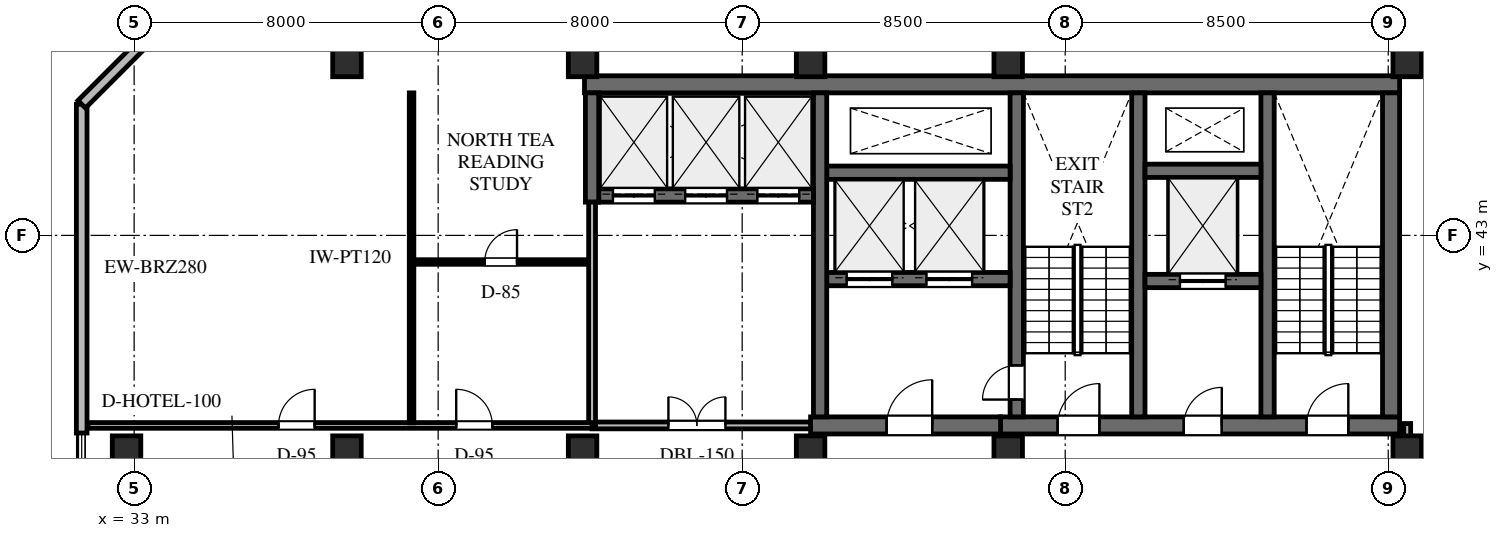
"""IFC4 building model, lengths in metres.
Left out: names, types, materials, properties, quantities, classifications, styles, units other than length and angle.
Written with IfcOpenShell. Run it as: python <this file> out.ifc"""

import sys

from ifc_helpers import new_model, si_unit, direction, frame, frame_2d, origin, origin_2d, place, context, subcontext, project, spatial, rectangle, extrude, element, fill, save


model = new_model("IFC4")
c1 = context("Model", 3, precision=1e-05, world=origin(), true_north=direction((0.0, 1.0)))
c2 = subcontext(c1, "Body", "Model", "MODEL_VIEW")
j1 = project(units=[si_unit("LENGTHUNIT", "METRE"), si_unit("PLANEANGLEUNIT", "RADIAN")], contexts=[c1])
p1 = place(None, origin())
s1 = spatial("IfcSite", under=j1, at=p1, CompositionType="ELEMENT")
p2 = place(p1, origin())
s2 = spatial("IfcBuilding", under=s1, at=p2, CompositionType="ELEMENT")
p3 = place(p2, frame((0.0, 0.0, 289.5)))
s3 = spatial("IfcBuildingStorey", under=s2, at=p3, CompositionType="ELEMENT", Elevation=289.5)
p4 = place(p3, frame((44.85, 46.975, 0.0), z_axis=(0.0, 0.0, 1.0), x_axis=(1.0, 0.0, 0.0)))
e1 = element("IfcWall", 1, at=p4, inside=s3, PredefinedType="SHEAR", context=c2, shape_type="SweptSolid", body=[
    extrude(rectangle(XDim=21.45, YDim=0.45, at=frame_2d((10.725, 0.0))), origin(), (0.0, 0.0, 1.0), 3.6),
])
p5 = place(p3, frame((55.8, 38.0, 0.0), z_axis=(0.0, 0.0, 1.0), x_axis=(1.0, 0.0, 0.0)))
e2 = element("IfcWall", 2, at=p5, inside=s3, PredefinedType="SHEAR", context=c2, shape_type="SweptSolid", body=[
    extrude(rectangle(XDim=10.5, YDim=0.45, at=frame_2d((5.25, 0.0))), origin(), (0.0, 0.0, 1.0), 3.6),
])
p6 = place(p5, frame((1.5, 0.0, 0.0)))
e3 = element("IfcOpeningElement", 3, at=p6, cuts=e2, PredefinedType="OPENING", context=c2, shape_type="SweptSolid", body=[
    extrude(rectangle(XDim=1.1, YDim=2.2, at=frame_2d((0.55, 1.1))), frame((0.0, 0.235, 0.0), z_axis=(0.0, -1.0, 0.0), x_axis=(1.0, 0.0, 0.0)), (0.0, 0.0, 1.0), 0.47),
])
p7 = place(p5, frame((4.82, 0.0, 0.0)))
e4 = element("IfcOpeningElement", 4, at=p7, cuts=e2, PredefinedType="OPENING", context=c2, shape_type="SweptSolid", body=[
    extrude(rectangle(XDim=1.0, YDim=2.15, at=frame_2d((0.5, 1.075))), frame((0.0, 0.235, 0.0), z_axis=(0.0, -1.0, 0.0), x_axis=(1.0, 0.0, 0.0)), (0.0, 0.0, 1.0), 0.47),
])
p8 = place(p5, frame((8.05, 0.0, 0.0)))
e5 = element("IfcOpeningElement", 5, at=p8, cuts=e2, PredefinedType="OPENING", context=c2, shape_type="SweptSolid", body=[
    extrude(rectangle(XDim=1.1, YDim=2.2, at=frame_2d((0.55, 1.1))), frame((0.0, 0.235, 0.0), z_axis=(0.0, -1.0, 0.0), x_axis=(1.0, 0.0, 0.0)), (0.0, 0.0, 1.0), 0.47),
])
p9 = place(p3, frame((66.075, 38.225, 0.0), z_axis=(0.0, 0.0, 1.0), x_axis=(0.0, 1.0, 0.0)))
e6 = element("IfcWall", 6, at=p9, inside=s3, PredefinedType="SHEAR", context=c2, shape_type="SweptSolid", body=[
    extrude(rectangle(XDim=8.525, YDim=0.45, at=frame_2d((4.262, 0.0))), origin(), (0.0, 0.0, 1.0), 3.6),
])
for number, where, z_axis, x_axis in (
    (7, (62.825, 38.225, 0.0), (0.0, 0.0, 1.0), (0.0, 1.0, 0.0)),
    (8, (59.425, 38.225, 0.0), (0.0, 0.0, 1.0), (0.0, 1.0, 0.0)),
):
    element("IfcWall", number, at=place(p3, frame(where, z_axis=z_axis, x_axis=x_axis)), inside=s3, PredefinedType="SHEAR", context=c2, shape_type="SweptSolid", body=[
        extrude(rectangle(XDim=8.525, YDim=0.35, at=frame_2d((4.262, 0.0))), origin(), (0.0, 0.0, 1.0), 3.6),
    ])
p10 = place(p3, frame((56.225, 38.225, 0.0), z_axis=(0.0, 0.0, 1.0), x_axis=(0.0, 1.0, 0.0)))
e9 = element("IfcWall", 9, at=p10, inside=s3, PredefinedType="SHEAR", context=c2, shape_type="SweptSolid", body=[
    extrude(rectangle(XDim=8.525, YDim=0.35, at=frame_2d((4.262, 0.0))), origin(), (0.0, 0.0, 1.0), 3.6),
])
p11 = place(p10, frame((0.455, 0.0, 0.0)))
e10 = element("IfcOpeningElement", 10, at=p11, cuts=e9, PredefinedType="OPENING", context=c2, shape_type="SweptSolid", body=[
    extrude(rectangle(XDim=0.9, YDim=2.15, at=frame_2d((0.45, 1.075))), frame((0.0, 0.185, 0.0), z_axis=(0.0, -1.0, 0.0), x_axis=(1.0, 0.0, 0.0)), (0.0, 0.0, 1.0), 0.37),
])
p12 = place(p3, frame((59.6, 41.8, 0.0), z_axis=(0.0, 0.0, 1.0), x_axis=(1.0, 0.0, 0.0)))
e11 = element("IfcWall", 11, at=p12, inside=s3, PredefinedType="SHEAR", context=c2, shape_type="SweptSolid", body=[
    extrude(rectangle(XDim=3.05, YDim=0.35, at=frame_2d((1.525, 0.0))), origin(), (0.0, 0.0, 1.0), 3.6),
])
p13 = place(p12, frame((0.92, 0.0, 0.0)))
e12 = element("IfcOpeningElement", 12, at=p13, cuts=e11, PredefinedType="OPENING", context=c2, shape_type="SweptSolid", body=[
    extrude(rectangle(XDim=1.2, YDim=2.2, at=frame_2d((0.6, 1.1))), frame((0.0, 0.185, 0.0), z_axis=(0.0, -1.0, 0.0), x_axis=(1.0, 0.0, 0.0)), (0.0, 0.0, 1.0), 0.37),
])
p14 = place(p3, frame((59.6, 44.7, 0.0), z_axis=(0.0, 0.0, 1.0), x_axis=(1.0, 0.0, 0.0)))
e13 = element("IfcWall", 13, at=p14, inside=s3, PredefinedType="SHEAR", context=c2, shape_type="SweptSolid", body=[
    extrude(rectangle(XDim=3.05, YDim=0.35, at=frame_2d((1.525, 0.0))), origin(), (0.0, 0.0, 1.0), 3.6),
])
p15 = place(p3, frame((50.8, 38.0, 0.0), z_axis=(0.0, 0.0, 1.0), x_axis=(1.0, 0.0, 0.0)))
e14 = element("IfcWall", 14, at=p15, inside=s3, PredefinedType="SHEAR", context=c2, shape_type="SweptSolid", body=[
    extrude(rectangle(XDim=5.0, YDim=0.45, at=frame_2d((2.5, 0.0))), origin(), (0.0, 0.0, 1.0), 3.6),
])
p16 = place(p15, frame((2.0, 0.0, 0.0)))
e15 = element("IfcOpeningElement", 15, at=p16, cuts=e14, PredefinedType="OPENING", context=c2, shape_type="SweptSolid", body=[
    extrude(rectangle(XDim=1.2, YDim=2.2, at=frame_2d((0.6, 1.1))), frame((0.0, 0.235, 0.0), z_axis=(0.0, -1.0, 0.0), x_axis=(1.0, 0.0, 0.0)), (0.0, 0.0, 1.0), 0.47),
])
p17 = place(p3, frame((51.225, 41.85, 0.0), z_axis=(0.0, 0.0, 1.0), x_axis=(1.0, 0.0, 0.0)))
e16 = element("IfcWall", 16, at=p17, inside=s3, PredefinedType="SHEAR", context=c2, shape_type="SweptSolid", body=[
    extrude(rectangle(XDim=4.825, YDim=0.35, at=frame_2d((2.413, 0.0))), origin(), (0.0, 0.0, 1.0), 3.6),
])
p18 = place(p17, frame((0.525, 0.0, 0.0)))
e17 = element("IfcOpeningElement", 17, at=p18, cuts=e16, PredefinedType="OPENING", context=c2, shape_type="SweptSolid", body=[
    extrude(rectangle(XDim=1.2, YDim=2.2, at=frame_2d((0.6, 1.1))), frame((0.0, 0.185, 0.0), z_axis=(0.0, -1.0, 0.0), x_axis=(1.0, 0.0, 0.0)), (0.0, 0.0, 1.0), 0.37),
])
p19 = place(p17, frame((2.625, 0.0, 0.0)))
e18 = element("IfcOpeningElement", 18, at=p19, cuts=e16, PredefinedType="OPENING", context=c2, shape_type="SweptSolid", body=[
    extrude(rectangle(XDim=1.2, YDim=2.2, at=frame_2d((0.6, 1.1))), frame((0.0, 0.185, 0.0), z_axis=(0.0, -1.0, 0.0), x_axis=(1.0, 0.0, 0.0)), (0.0, 0.0, 1.0), 0.37),
])
p20 = place(p3, frame((51.225, 44.65, 0.0), z_axis=(0.0, 0.0, 1.0), x_axis=(1.0, 0.0, 0.0)))
e19 = element("IfcWall", 19, at=p20, inside=s3, PredefinedType="SHEAR", context=c2, shape_type="SweptSolid", body=[
    extrude(rectangle(XDim=4.825, YDim=0.35, at=frame_2d((2.413, 0.0))), origin(), (0.0, 0.0, 1.0), 3.6),
])
p21 = place(p3, frame((51.05, 38.225, 0.0), z_axis=(0.0, 0.0, 1.0), x_axis=(0.0, 1.0, 0.0)))
e20 = element("IfcWall", 20, at=p21, inside=s3, PredefinedType="SHEAR", context=c2, shape_type="SweptSolid", body=[
    extrude(rectangle(XDim=8.525, YDim=0.35, at=frame_2d((4.262, 0.0))), origin(), (0.0, 0.0, 1.0), 3.6),
])
p22 = place(p3, frame((45.225, 44.05, 0.0), z_axis=(0.0, 0.0, 1.0), x_axis=(1.0, 0.0, 0.0)))
e21 = element("IfcWall", 21, at=p22, inside=s3, PredefinedType="SHEAR", context=c2, shape_type="SweptSolid", body=[
    extrude(rectangle(XDim=5.65, YDim=0.35, at=frame_2d((2.825, 0.0))), origin(), (0.0, 0.0, 1.0), 3.6),
])
p23 = place(p22, frame((0.375, 0.0, 0.0)))
e22 = element("IfcOpeningElement", 22, at=p23, cuts=e21, PredefinedType="OPENING", context=c2, shape_type="SweptSolid", body=[
    extrude(rectangle(XDim=1.1, YDim=2.2, at=frame_2d((0.55, 1.1))), frame((0.0, 0.185, 0.0), z_axis=(0.0, -1.0, 0.0), x_axis=(1.0, 0.0, 0.0)), (0.0, 0.0, 1.0), 0.37),
])
p24 = place(p22, frame((2.275, 0.0, 0.0)))
e23 = element("IfcOpeningElement", 23, at=p24, cuts=e21, PredefinedType="OPENING", context=c2, shape_type="SweptSolid", body=[
    extrude(rectangle(XDim=1.1, YDim=2.2, at=frame_2d((0.55, 1.1))), frame((0.0, 0.185, 0.0), z_axis=(0.0, -1.0, 0.0), x_axis=(1.0, 0.0, 0.0)), (0.0, 0.0, 1.0), 0.37),
])
p25 = place(p22, frame((4.175, 0.0, 0.0)))
e24 = element("IfcOpeningElement", 24, at=p25, cuts=e21, PredefinedType="OPENING", context=c2, shape_type="SweptSolid", body=[
    extrude(rectangle(XDim=1.1, YDim=2.2, at=frame_2d((0.55, 1.1))), frame((0.0, 0.185, 0.0), z_axis=(0.0, -1.0, 0.0), x_axis=(1.0, 0.0, 0.0)), (0.0, 0.0, 1.0), 0.37),
])
p26 = place(p3, frame((45.05, 43.875, 0.0), z_axis=(0.0, 0.0, 1.0), x_axis=(0.0, 1.0, 0.0)))
e25 = element("IfcWall", 25, at=p26, inside=s3, PredefinedType="SHEAR", context=c2, shape_type="SweptSolid", body=[
    extrude(rectangle(XDim=2.875, YDim=0.35, at=frame_2d((1.438, 0.0))), origin(), (0.0, 0.0, 1.0), 3.6),
])
for number, where, z_axis, x_axis in (
    (26, (66.5, 47.55, 0.0), (0.0, 0.0, 1.0), (1.0, 0.0, 0.0)),
    (27, (56.0, 47.55, 0.0), (0.0, 0.0, 1.0), (1.0, 0.0, 0.0)),
    (28, (66.5, 37.35, 0.0), (0.0, 0.0, 1.0), (1.0, 0.0, 0.0)),
    (29, (56.0, 37.35, 0.0), (0.0, 0.0, 1.0), (1.0, 0.0, 0.0)),
    (30, (50.8, 47.55, 0.0), (0.0, 0.0, 1.0), (1.0, 0.0, 0.0)),
    (31, (50.8, 37.35, 0.0), (0.0, 0.0, 1.0), (1.0, 0.0, 0.0)),
    (32, (44.8, 37.35, 0.0), (0.0, 0.0, 1.0), (1.0, 0.0, 0.0)),
    (33, (44.8, 47.55, 0.0), (0.0, 0.0, 1.0), (1.0, 0.0, 0.0)),
    (34, (38.6, 37.35, 0.0), (0.0, 0.0, 1.0), (1.0, 0.0, 0.0)),
    (35, (38.6, 47.55, 0.0), (0.0, 0.0, 1.0), (1.0, 0.0, 0.0)),
    (36, (32.8, 37.35, 0.0), (0.0, 0.0, 1.0), (1.0, 0.0, 0.0)),
):
    element("IfcColumn", number, at=place(p3, frame(where, z_axis=z_axis, x_axis=x_axis)), inside=s3, PredefinedType="COLUMN", context=c2, shape_type="SweptSolid", body=[
        extrude(rectangle(XDim=0.75, YDim=0.75, at=origin_2d()), origin(), (0.0, 0.0, 1.0), 3.6),
    ])
p27 = place(p3, frame((31.62, 37.8, 0.0), z_axis=(0.0, 0.0, 1.0), x_axis=(0.0, 1.0, 0.0)))
e37 = element("IfcWall", 37, at=p27, inside=s3, PredefinedType="STANDARD", context=c2, shape_type="SweptSolid", body=[
    extrude(rectangle(XDim=8.65, YDim=0.28, at=frame_2d((4.325, 0.0))), origin(), (0.0, 0.0, 1.0), 3.365),
])
p28 = place(p3, frame((31.62, 46.45, 0.0), z_axis=(0.0, 0.0, 1.0), x_axis=(0.707106781187, 0.707106781187, 0.0)))
e38 = element("IfcWall", 38, at=p28, inside=s3, PredefinedType="STANDARD", context=c2, shape_type="SweptSolid", body=[
    extrude(rectangle(XDim=2.729, YDim=0.28, at=frame_2d((1.365, 0.0))), origin(), (0.0, 0.0, 1.0), 3.365),
])
p29 = place(p3, frame((68.375, 37.8, 0.0), z_axis=(0.0, 0.0, 1.0), x_axis=(-0.139171056495, -0.99026835607, 0.0)))
e39 = element("IfcWall", 39, at=p29, inside=s3, PredefinedType="STANDARD", context=c2, shape_type="SweptSolid", body=[
    extrude(rectangle(XDim=16.923, YDim=0.28, at=frame_2d((8.462, 0.0))), origin(), (0.0, 0.0, 1.0), 3.365),
])
p30 = place(p29, frame((8.481, 0.0, 0.0)))
e40 = element("IfcOpeningElement", 40, at=p30, cuts=e39, PredefinedType="OPENING", context=c2, shape_type="SweptSolid", body=[
    extrude(rectangle(XDim=1.0, YDim=2.15, at=frame_2d((0.5, 1.075))), frame((0.0, 0.15, 0.0), z_axis=(0.0, -1.0, 0.0), x_axis=(1.0, 0.0, 0.0)), (0.0, 0.0, 1.0), 0.3),
])
p31 = place(p29, frame((3.875, 0.0, 0.65)))
e41 = element("IfcOpeningElement", 41, at=p31, cuts=e39, PredefinedType="OPENING", context=c2, shape_type="SweptSolid", body=[
    extrude(rectangle(XDim=1.8, YDim=2.1, at=frame_2d((0.9, 1.05))), frame((0.0, 0.15, 0.0), z_axis=(0.0, -1.0, 0.0), x_axis=(1.0, 0.0, 0.0)), (0.0, 0.0, 1.0), 0.3),
])
p32 = place(p29, frame((11.852, 0.0, 0.65)))
e42 = element("IfcOpeningElement", 42, at=p32, cuts=e39, PredefinedType="OPENING", context=c2, shape_type="SweptSolid", body=[
    extrude(rectangle(XDim=1.8, YDim=2.1, at=frame_2d((0.9, 1.05))), frame((0.0, 0.15, 0.0), z_axis=(0.0, -1.0, 0.0), x_axis=(1.0, 0.0, 0.0)), (0.0, 0.0, 1.0), 0.3),
])
p33 = place(p3, frame((45.05, 38.0, 0.0), z_axis=(0.0, 0.0, 1.0), x_axis=(1.0, 0.0, 0.0)))
e43 = element("IfcWall", 43, at=p33, inside=s3, PredefinedType="STANDARD", context=c2, shape_type="SweptSolid", body=[
    extrude(rectangle(XDim=5.75, YDim=0.18, at=frame_2d((2.875, 0.0))), origin(), (0.0, 0.0, 1.0), 2.754),
])
p34 = place(p33, frame((2.009, 0.0, 0.0)))
e44 = element("IfcOpeningElement", 44, at=p34, cuts=e43, PredefinedType="OPENING", context=c2, shape_type="SweptSolid", body=[
    extrude(rectangle(XDim=1.5, YDim=2.2, at=frame_2d((0.75, 1.1))), frame((0.0, 0.1, 0.0), z_axis=(0.0, -1.0, 0.0), x_axis=(1.0, 0.0, 0.0)), (0.0, 0.0, 1.0), 0.2),
])
p35 = place(p3, frame((45.05, 38.0, 0.0), z_axis=(0.0, 0.0, 1.0), x_axis=(0.0, 1.0, 0.0)))
e45 = element("IfcWall", 45, at=p35, inside=s3, PredefinedType="STANDARD", context=c2, shape_type="SweptSolid", body=[
    extrude(rectangle(XDim=5.875, YDim=0.18, at=frame_2d((2.938, 0.0))), origin(), (0.0, 0.0, 1.0), 2.754),
])
p36 = place(p3, frame((31.785, 38.0, 0.0), z_axis=(0.0, 0.0, 1.0), x_axis=(1.0, 0.0, 0.0)))
e46 = element("IfcWall", 46, at=p36, inside=s3, PredefinedType="PARTITIONING", context=c2, shape_type="SweptSolid", body=[
    extrude(rectangle(XDim=13.265, YDim=0.15, at=frame_2d((6.633, 0.0))), origin(), (0.0, 0.0, 1.0), 2.754),
])
p37 = place(p36, frame((5.015, 0.0, 0.0)))
e47 = element("IfcOpeningElement", 47, at=p37, cuts=e46, PredefinedType="OPENING", context=c2, shape_type="SweptSolid", body=[
    extrude(rectangle(XDim=0.95, YDim=2.15, at=frame_2d((0.475, 1.075))), frame((0.0, 0.085, 0.0), z_axis=(0.0, -1.0, 0.0), x_axis=(1.0, 0.0, 0.0)), (0.0, 0.0, 1.0), 0.17),
])
p38 = place(p36, frame((9.69, 0.0, 0.0)))
e48 = element("IfcOpeningElement", 48, at=p38, cuts=e46, PredefinedType="OPENING", context=c2, shape_type="SweptSolid", body=[
    extrude(rectangle(XDim=0.95, YDim=2.15, at=frame_2d((0.475, 1.075))), frame((0.0, 0.085, 0.0), z_axis=(0.0, -1.0, 0.0), x_axis=(1.0, 0.0, 0.0)), (0.0, 0.0, 1.0), 0.17),
])
p39 = place(p3, frame((40.3, 38.068, 0.0), z_axis=(0.0, 0.0, 1.0), x_axis=(0.0, 1.0, 0.0)))
e49 = element("IfcWall", 49, at=p39, inside=s3, PredefinedType="PARTITIONING", context=c2, shape_type="SweptSolid", body=[
    extrude(rectangle(XDim=8.682, YDim=0.12, at=frame_2d((4.341, 0.0))), origin(), (0.0, 0.0, 1.0), 3.365),
])
p40 = place(p3, frame((40.368, 42.3, 0.0), z_axis=(0.0, 0.0, 1.0), x_axis=(1.0, 0.0, 0.0)))
e50 = element("IfcWall", 50, at=p40, inside=s3, PredefinedType="PARTITIONING", context=c2, shape_type="SweptSolid", body=[
    extrude(rectangle(XDim=4.564, YDim=0.12, at=frame_2d((2.282, 0.0))), origin(), (0.0, 0.0, 1.0), 2.754),
])
p41 = place(p40, frame((1.857, 0.0, 0.0)))
e51 = element("IfcOpeningElement", 51, at=p41, cuts=e50, PredefinedType="OPENING", context=c2, shape_type="SweptSolid", body=[
    extrude(rectangle(XDim=0.85, YDim=2.1, at=frame_2d((0.425, 1.05))), frame((0.0, 0.07, 0.0), z_axis=(0.0, -1.0, 0.0), x_axis=(1.0, 0.0, 0.0)), (0.0, 0.0, 1.0), 0.14),
])
p42 = place(p3, frame((66.5, 35.468, 0.0), z_axis=(0.0, 0.0, 1.0), x_axis=(0.0, 1.0, 0.0)))
e52 = element("IfcWall", 52, at=p42, inside=s3, PredefinedType="STANDARD", context=c2, shape_type="SweptSolid", body=[
    extrude(rectangle(XDim=2.582, YDim=0.18, at=frame_2d((1.291, 0.0))), origin(), (0.0, 0.0, 1.0), 2.754),
])
p43 = place(p6, origin())
e53 = element("IfcDoor", 53, at=p43, inside=s3, OperationType="SINGLE_SWING_RIGHT", PredefinedType="DOOR", context=c2, shape_type="SweptSolid", body=[
    extrude(rectangle(XDim=1.1, YDim=2.2, at=frame_2d((0.55, 1.1))), frame((0.0, 0.025, 0.0), z_axis=(0.0, -1.0, 0.0), x_axis=(1.0, 0.0, 0.0)), (0.0, 0.0, 1.0), 0.05),
])
fill(e3, e53)
p44 = place(p7, origin())
e54 = element("IfcDoor", 54, at=p44, inside=s3, OperationType="SINGLE_SWING_RIGHT", PredefinedType="DOOR", context=c2, shape_type="SweptSolid", body=[
    extrude(rectangle(XDim=1.0, YDim=2.15, at=frame_2d((0.5, 1.075))), frame((0.0, 0.025, 0.0), z_axis=(0.0, -1.0, 0.0), x_axis=(1.0, 0.0, 0.0)), (0.0, 0.0, 1.0), 0.05),
])
fill(e4, e54)
p45 = place(p8, origin())
e55 = element("IfcDoor", 55, at=p45, inside=s3, OperationType="SINGLE_SWING_RIGHT", PredefinedType="DOOR", context=c2, shape_type="SweptSolid", body=[
    extrude(rectangle(XDim=1.1, YDim=2.2, at=frame_2d((0.55, 1.1))), frame((0.0, 0.025, 0.0), z_axis=(0.0, -1.0, 0.0), x_axis=(1.0, 0.0, 0.0)), (0.0, 0.0, 1.0), 0.05),
])
fill(e5, e55)
p46 = place(p16, origin())
e56 = element("IfcDoor", 56, at=p46, inside=s3, OperationType="SINGLE_SWING_RIGHT", PredefinedType="DOOR", context=c2, shape_type="SweptSolid", body=[
    extrude(rectangle(XDim=1.2, YDim=2.2, at=frame_2d((0.6, 1.1))), frame((0.0, 0.025, 0.0), z_axis=(0.0, -1.0, 0.0), x_axis=(1.0, 0.0, 0.0)), (0.0, 0.0, 1.0), 0.05),
])
fill(e15, e56)
p47 = place(p11, origin())
e57 = element("IfcDoor", 57, at=p47, inside=s3, OperationType="SINGLE_SWING_LEFT", PredefinedType="DOOR", context=c2, shape_type="SweptSolid", body=[
    extrude(rectangle(XDim=0.9, YDim=2.15, at=frame_2d((0.45, 1.075))), frame((0.0, 0.025, 0.0), z_axis=(0.0, -1.0, 0.0), x_axis=(1.0, 0.0, 0.0)), (0.0, 0.0, 1.0), 0.05),
])
fill(e10, e57)
p48 = place(p23, origin())
e58 = element("IfcDoor", 58, at=p48, inside=s3, OperationType="DOUBLE_DOOR_SLIDING", PredefinedType="DOOR", context=c2, shape_type="SweptSolid", body=[
    extrude(rectangle(XDim=1.1, YDim=2.2, at=frame_2d((0.55, 1.1))), frame((0.0, 0.025, 0.0), z_axis=(0.0, -1.0, 0.0), x_axis=(1.0, 0.0, 0.0)), (0.0, 0.0, 1.0), 0.05),
])
fill(e22, e58)
p49 = place(p24, origin())
e59 = element("IfcDoor", 59, at=p49, inside=s3, OperationType="DOUBLE_DOOR_SLIDING", PredefinedType="DOOR", context=c2, shape_type="SweptSolid", body=[
    extrude(rectangle(XDim=1.1, YDim=2.2, at=frame_2d((0.55, 1.1))), frame((0.0, 0.025, 0.0), z_axis=(0.0, -1.0, 0.0), x_axis=(1.0, 0.0, 0.0)), (0.0, 0.0, 1.0), 0.05),
])
fill(e23, e59)
p50 = place(p25, origin())
e60 = element("IfcDoor", 60, at=p50, inside=s3, OperationType="DOUBLE_DOOR_SLIDING", PredefinedType="DOOR", context=c2, shape_type="SweptSolid", body=[
    extrude(rectangle(XDim=1.1, YDim=2.2, at=frame_2d((0.55, 1.1))), frame((0.0, 0.025, 0.0), z_axis=(0.0, -1.0, 0.0), x_axis=(1.0, 0.0, 0.0)), (0.0, 0.0, 1.0), 0.05),
])
fill(e24, e60)
p51 = place(p18, origin())
e61 = element("IfcDoor", 61, at=p51, inside=s3, OperationType="DOUBLE_DOOR_SLIDING", PredefinedType="DOOR", context=c2, shape_type="SweptSolid", body=[
    extrude(rectangle(XDim=1.2, YDim=2.2, at=frame_2d((0.6, 1.1))), frame((0.0, 0.025, 0.0), z_axis=(0.0, -1.0, 0.0), x_axis=(1.0, 0.0, 0.0)), (0.0, 0.0, 1.0), 0.05),
])
fill(e17, e61)
p52 = place(p19, origin())
e62 = element("IfcDoor", 62, at=p52, inside=s3, OperationType="DOUBLE_DOOR_SLIDING", PredefinedType="DOOR", context=c2, shape_type="SweptSolid", body=[
    extrude(rectangle(XDim=1.2, YDim=2.2, at=frame_2d((0.6, 1.1))), frame((0.0, 0.025, 0.0), z_axis=(0.0, -1.0, 0.0), x_axis=(1.0, 0.0, 0.0)), (0.0, 0.0, 1.0), 0.05),
])
fill(e18, e62)
p53 = place(p13, origin())
e63 = element("IfcDoor", 63, at=p53, inside=s3, OperationType="DOUBLE_DOOR_SLIDING", PredefinedType="DOOR", context=c2, shape_type="SweptSolid", body=[
    extrude(rectangle(XDim=1.2, YDim=2.2, at=frame_2d((0.6, 1.1))), frame((0.0, 0.025, 0.0), z_axis=(0.0, -1.0, 0.0), x_axis=(1.0, 0.0, 0.0)), (0.0, 0.0, 1.0), 0.05),
])
fill(e12, e63)
p54 = place(p34, origin())
e64 = element("IfcDoor", 64, at=p54, inside=s3, OperationType="DOUBLE_DOOR_SINGLE_SWING", PredefinedType="DOOR", context=c2, shape_type="SweptSolid", body=[
    extrude(rectangle(XDim=1.5, YDim=2.2, at=frame_2d((0.75, 1.1))), frame((0.0, 0.025, 0.0), z_axis=(0.0, -1.0, 0.0), x_axis=(1.0, 0.0, 0.0)), (0.0, 0.0, 1.0), 0.05),
])
fill(e44, e64)
p55 = place(p37, origin())
e65 = element("IfcDoor", 65, at=p55, inside=s3, OperationType="SINGLE_SWING_RIGHT", PredefinedType="DOOR", context=c2, shape_type="SweptSolid", body=[
    extrude(rectangle(XDim=0.95, YDim=2.15, at=frame_2d((0.475, 1.075))), frame((0.0, 0.025, 0.0), z_axis=(0.0, -1.0, 0.0), x_axis=(1.0, 0.0, 0.0)), (0.0, 0.0, 1.0), 0.05),
])
fill(e47, e65)
p56 = place(p38, origin())
e66 = element("IfcDoor", 66, at=p56, inside=s3, OperationType="SINGLE_SWING_LEFT", PredefinedType="DOOR", context=c2, shape_type="SweptSolid", body=[
    extrude(rectangle(XDim=0.95, YDim=2.15, at=frame_2d((0.475, 1.075))), frame((0.0, 0.025, 0.0), z_axis=(0.0, -1.0, 0.0), x_axis=(1.0, 0.0, 0.0)), (0.0, 0.0, 1.0), 0.05),
])
fill(e48, e66)
p57 = place(p41, origin())
e67 = element("IfcDoor", 67, at=p57, inside=s3, OperationType="SINGLE_SWING_RIGHT", PredefinedType="DOOR", context=c2, shape_type="SweptSolid", body=[
    extrude(rectangle(XDim=0.85, YDim=2.1, at=frame_2d((0.425, 1.05))), frame((0.0, 0.025, 0.0), z_axis=(0.0, -1.0, 0.0), x_axis=(1.0, 0.0, 0.0)), (0.0, 0.0, 1.0), 0.05),
])
fill(e51, e67)
save(model, sys.argv[1])
